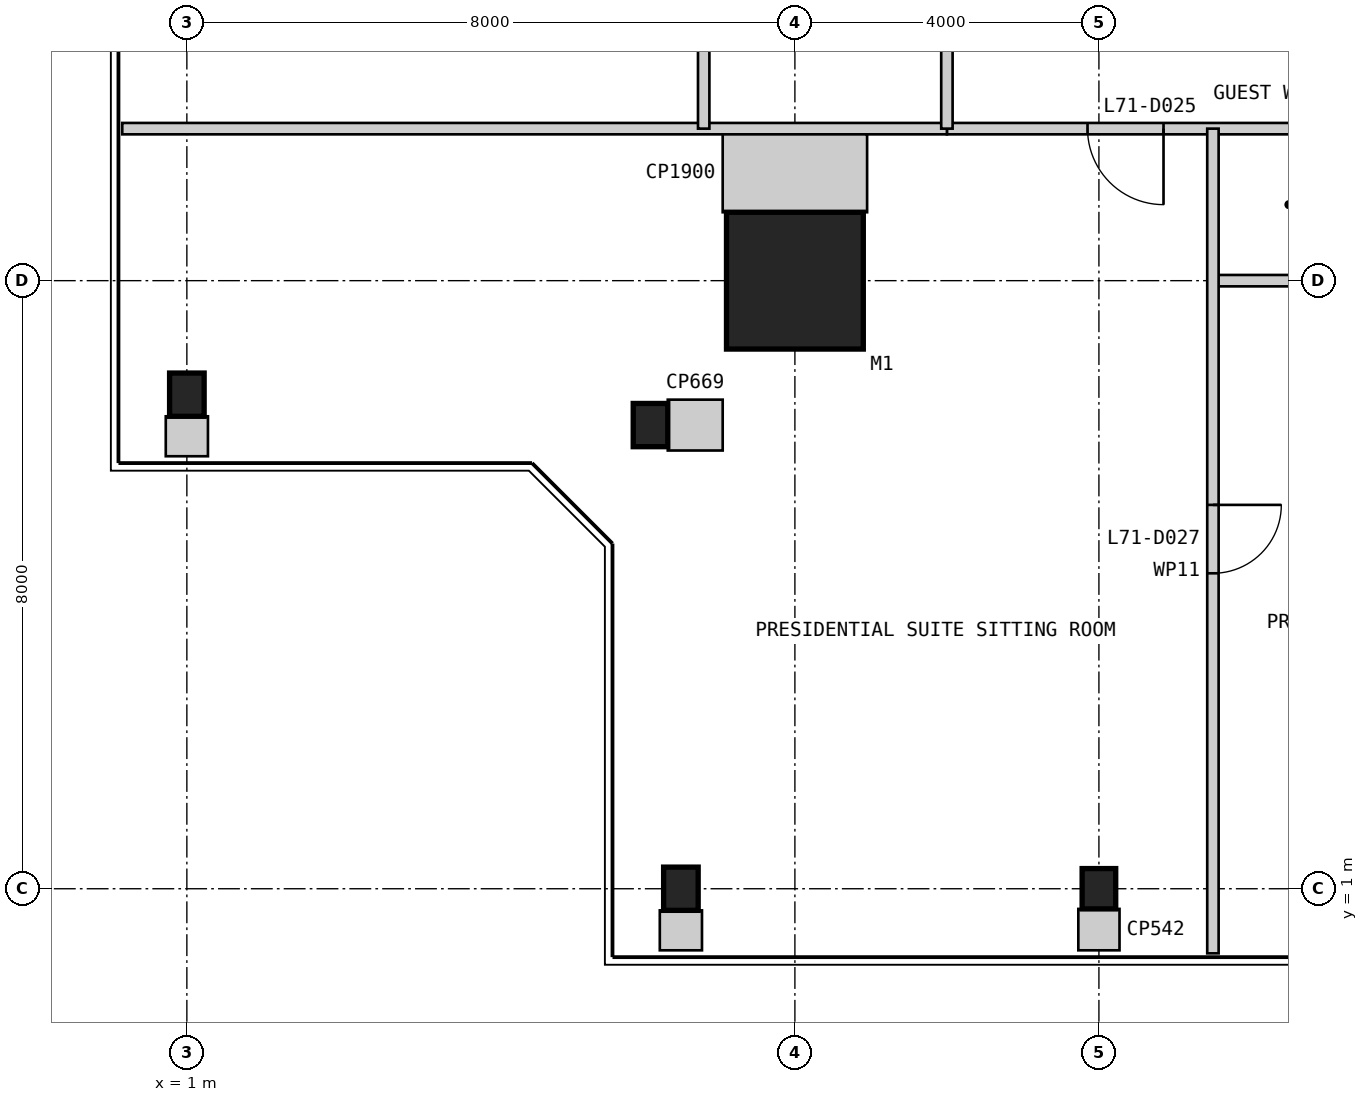
"""IFC4 building model, lengths in metres.
Left out: names, types, materials, properties, quantities, classifications, styles, units other than length and angle.
Written with IfcOpenShell. Run it as: python <this file> out.ifc"""

import sys

from ifc_helpers import new_model, si_unit, direction, frame, frame_2d, origin, origin_2d, place, context, subcontext, project, spatial, rectangle, i_section, extrude, element, fill, save


model = new_model("IFC4")
c1 = context("Model", 3, precision=1e-05, world=origin(), true_north=direction((0.0, 1.0)))
c2 = subcontext(c1, "Body", "Model", "MODEL_VIEW")
j1 = project(units=[si_unit("LENGTHUNIT", "METRE"), si_unit("PLANEANGLEUNIT", "RADIAN")], contexts=[c1])
p1 = place(None, origin())
s1 = spatial("IfcSite", under=j1, at=p1, CompositionType="ELEMENT")
p2 = place(p1, origin())
s2 = spatial("IfcBuilding", under=s1, at=p2, CompositionType="ELEMENT")
p3 = place(p2, frame((0.0, 0.0, 293.4)))
s3 = spatial("IfcBuildingStorey", under=s2, at=p3, CompositionType="ELEMENT", Elevation=293.4)
p4 = place(p3, frame((9.0, 9.0, 0.0), z_axis=(0.0, 0.0, 1.0), x_axis=(1.0, 0.0, 0.0)))
e1 = element("IfcColumn", 1, at=p4, inside=s3, PredefinedType="COLUMN", context=c2, shape_type="SweptSolid", body=[
    extrude(rectangle(XDim=1.8, YDim=1.8, at=origin_2d()), origin(), (0.0, 0.0, 1.0), 3.4),
])
p5 = place(p3, frame((7.5, 1.0, 0.0), z_axis=(0.0, 0.0, 1.0), x_axis=(1.0, 0.0, 0.0)))
e2 = element("IfcColumn", 2, at=p5, inside=s3, PredefinedType="COLUMN", context=c2, shape_type="SweptSolid", body=[
    extrude(i_section(OverallWidth=0.455, OverallDepth=0.569, WebThickness=0.078, FlangeThickness=0.125, at=origin_2d()), origin(), (0.0, 0.0, 1.0), 3.4),
])
p6 = place(p3, frame((13.0, 1.0, 0.0), z_axis=(0.0, 0.0, 1.0), x_axis=(1.0, 0.0, 0.0)))
e3 = element("IfcColumn", 3, at=p6, inside=s3, PredefinedType="COLUMN", context=c2, shape_type="SweptSolid", body=[
    extrude(i_section(OverallWidth=0.442, OverallDepth=0.531, WebThickness=0.066, FlangeThickness=0.106, at=origin_2d()), origin(), (0.0, 0.0, 1.0), 3.4),
])
for number, where, z_axis, x_axis in (
    (4, (1.0, 7.5, 0.0), (0.0, 0.0, 1.0), (1.0, 0.0, 0.0)),
    (5, (7.1, 7.1, 0.0), (0.0, 0.0, 1.0), (1.0, 0.0, 0.0)),
):
    element("IfcColumn", number, at=place(p3, frame(where, z_axis=z_axis, x_axis=x_axis)), inside=s3, PredefinedType="COLUMN", context=c2, shape_type="SweptSolid", body=[
        extrude(i_section(OverallWidth=0.455, OverallDepth=0.569, WebThickness=0.078, FlangeThickness=0.125, at=origin_2d()), origin(), (0.0, 0.0, 1.0), 3.4),
    ])
p7 = place(p3, frame((11.0, 11.0, 0.0), z_axis=(0.0, 0.0, 1.0), x_axis=(1.0, 0.0, 0.0)))
e6 = element("IfcWall", 6, at=p7, inside=s3, PredefinedType="PARTITIONING", context=c2, shape_type="SweptSolid", body=[
    extrude(rectangle(XDim=28.0, YDim=0.15, at=frame_2d((14.0, 0.0))), origin(), (0.0, 0.0, 1.0), 2.794),
])
p8 = place(p7, frame((1.85, 0.0, 0.0)))
e7 = element("IfcOpeningElement", 7, at=p8, cuts=e6, PredefinedType="OPENING", context=c2, shape_type="SweptSolid", body=[
    extrude(rectangle(XDim=1.0, YDim=2.1, at=frame_2d((0.5, 1.05))), frame((0.0, 0.085, 0.0), z_axis=(0.0, -1.0, 0.0), x_axis=(1.0, 0.0, 0.0)), (0.0, 0.0, 1.0), 0.17),
])
p9 = place(p7, frame((18.1, 0.0, 0.0)))
e8 = element("IfcOpeningElement", 8, at=p9, cuts=e6, PredefinedType="OPENING", context=c2, shape_type="SweptSolid", body=[
    extrude(rectangle(XDim=0.9, YDim=2.1, at=frame_2d((0.45, 1.05))), frame((0.0, 0.085, 0.0), z_axis=(0.0, -1.0, 0.0), x_axis=(1.0, 0.0, 0.0)), (0.0, 0.0, 1.0), 0.17),
])
p10 = place(p3, frame((0.15, 11.0, 0.0), z_axis=(0.0, 0.0, 1.0), x_axis=(1.0, 0.0, 0.0)))
e9 = element("IfcWall", 9, at=p10, inside=s3, PredefinedType="PARTITIONING", context=c2, shape_type="SweptSolid", body=[
    extrude(rectangle(XDim=10.85, YDim=0.15, at=frame_2d((5.425, 0.0))), origin(), (0.0, 0.0, 1.0), 2.794),
])
p11 = place(p3, frame((14.5, 9.0, 0.0), z_axis=(0.0, 0.0, 1.0), x_axis=(1.0, 0.0, 0.0)))
e10 = element("IfcWall", 10, at=p11, inside=s3, PredefinedType="PARTITIONING", context=c2, shape_type="SweptSolid", body=[
    extrude(rectangle(XDim=2.0, YDim=0.15, at=frame_2d((1.0, 0.0))), origin(), (0.0, 0.0, 1.0), 3.2),
])
p12 = place(p3, frame((14.5, 0.15, 0.0), z_axis=(0.0, 0.0, 1.0), x_axis=(0.0, 1.0, 0.0)))
e11 = element("IfcWall", 11, at=p12, inside=s3, PredefinedType="PARTITIONING", context=c2, shape_type="SweptSolid", body=[
    extrude(rectangle(XDim=10.85, YDim=0.15, at=frame_2d((5.425, 0.0))), origin(), (0.0, 0.0, 1.0), 3.2),
])
p13 = place(p12, frame((5.0, 0.0, 0.0)))
e12 = element("IfcOpeningElement", 12, at=p13, cuts=e11, PredefinedType="OPENING", context=c2, shape_type="SweptSolid", body=[
    extrude(rectangle(XDim=0.9, YDim=2.1, at=frame_2d((0.45, 1.05))), frame((0.0, 0.085, 0.0), z_axis=(0.0, -1.0, 0.0), x_axis=(1.0, 0.0, 0.0)), (0.0, 0.0, 1.0), 0.17),
])
p14 = place(p3, frame((11.0, 39.0, 0.0), z_axis=(0.0, 0.0, 1.0), x_axis=(0.0, -1.0, 0.0)))
e13 = element("IfcWall", 13, at=p14, inside=s3, PredefinedType="PARTITIONING", context=c2, shape_type="SweptSolid", body=[
    extrude(rectangle(XDim=28.0, YDim=0.15, at=frame_2d((14.0, 0.0))), origin(), (0.0, 0.0, 1.0), 2.794),
])
p15 = place(p14, frame((1.85, 0.0, 0.0)))
e14 = element("IfcOpeningElement", 14, at=p15, cuts=e13, PredefinedType="OPENING", context=c2, shape_type="SweptSolid", body=[
    extrude(rectangle(XDim=0.9, YDim=2.1, at=frame_2d((0.45, 1.05))), frame((0.0, 0.085, 0.0), z_axis=(0.0, -1.0, 0.0), x_axis=(1.0, 0.0, 0.0)), (0.0, 0.0, 1.0), 0.17),
])
p16 = place(p14, frame((11.0, 0.0, 0.0)))
e15 = element("IfcOpeningElement", 15, at=p16, cuts=e13, PredefinedType="OPENING", context=c2, shape_type="SweptSolid", body=[
    extrude(rectangle(XDim=0.9, YDim=2.1, at=frame_2d((0.45, 1.05))), frame((0.0, 0.085, 0.0), z_axis=(0.0, -1.0, 0.0), x_axis=(1.0, 0.0, 0.0)), (0.0, 0.0, 1.0), 0.17),
])
p17 = place(p14, frame((23.1, 0.0, 0.0)))
e16 = element("IfcOpeningElement", 16, at=p17, cuts=e13, PredefinedType="OPENING", context=c2, shape_type="SweptSolid", body=[
    extrude(rectangle(XDim=0.9, YDim=2.1, at=frame_2d((0.45, 1.05))), frame((0.0, 0.085, 0.0), z_axis=(0.0, -1.0, 0.0), x_axis=(1.0, 0.0, 0.0)), (0.0, 0.0, 1.0), 0.17),
])
p18 = place(p3, frame((7.8, 14.4, 0.0), z_axis=(0.0, 0.0, 1.0), x_axis=(0.0, -1.0, 0.0)))
e17 = element("IfcWall", 17, at=p18, inside=s3, PredefinedType="PARTITIONING", context=c2, shape_type="SweptSolid", body=[
    extrude(rectangle(XDim=3.4, YDim=0.15, at=frame_2d((1.7, 0.0))), origin(), (0.0, 0.0, 1.0), 3.2),
])
p19 = place(p3, frame((9.0, 10.925, 0.0), z_axis=(0.0, 0.0, 1.0), x_axis=(0.0, -1.0, 0.0)))
e18 = element("IfcWall", 18, at=p19, inside=s3, PredefinedType="PARTITIONING", context=c2, shape_type="SweptSolid", body=[
    extrude(rectangle(XDim=1.025, YDim=1.9, at=frame_2d((0.513, 0.0))), origin(), (0.0, 0.0, 1.0), 3.2),
])
p20 = place(p3, frame((7.5, 0.19, 0.0), z_axis=(0.0, 0.0, 1.0), x_axis=(0.0, 1.0, 0.0)))
e19 = element("IfcWall", 19, at=p20, inside=s3, PredefinedType="PARTITIONING", context=c2, shape_type="SweptSolid", body=[
    extrude(rectangle(XDim=0.526, YDim=0.555, at=frame_2d((0.263, 0.0))), origin(), (0.0, 0.0, 1.0), 3.2),
])
p21 = place(p3, frame((13.0, 0.19, 0.0), z_axis=(0.0, 0.0, 1.0), x_axis=(0.0, 1.0, 0.0)))
e20 = element("IfcWall", 20, at=p21, inside=s3, PredefinedType="PARTITIONING", context=c2, shape_type="SweptSolid", body=[
    extrude(rectangle(XDim=0.545, YDim=0.542, at=frame_2d((0.272, 0.0))), origin(), (0.0, 0.0, 1.0), 3.2),
])
p22 = place(p3, frame((1.0, 6.69, 0.0), z_axis=(0.0, 0.0, 1.0), x_axis=(0.0, 1.0, 0.0)))
e21 = element("IfcWall", 21, at=p22, inside=s3, PredefinedType="PARTITIONING", context=c2, shape_type="SweptSolid", body=[
    extrude(rectangle(XDim=0.526, YDim=0.555, at=frame_2d((0.263, 0.0))), origin(), (0.0, 0.0, 1.0), 3.2),
])
p23 = place(p3, frame((8.05, 7.1, 0.0), z_axis=(0.0, 0.0, 1.0), x_axis=(-1.0, 0.0, 0.0)))
e22 = element("IfcWall", 22, at=p23, inside=s3, PredefinedType="PARTITIONING", context=c2, shape_type="SweptSolid", body=[
    extrude(rectangle(XDim=0.723, YDim=0.669, at=frame_2d((0.361, 0.0))), origin(), (0.0, 0.0, 1.0), 3.2),
])
p24 = place(p8, frame((1.0, 0.0, 0.0), z_axis=(0.0, 0.0, 1.0), x_axis=(-1.0, 0.0, 0.0)))
e23 = element("IfcDoor", 23, at=p24, inside=s3, OperationType="SINGLE_SWING_LEFT", PredefinedType="DOOR", context=c2, shape_type="SweptSolid", body=[
    extrude(rectangle(XDim=1.0, YDim=2.1, at=frame_2d((0.5, 1.05))), frame((0.0, 0.025, 0.0), z_axis=(0.0, -1.0, 0.0), x_axis=(1.0, 0.0, 0.0)), (0.0, 0.0, 1.0), 0.05),
])
fill(e7, e23)
p25 = place(p13, frame((0.9, 0.0, 0.0), z_axis=(0.0, 0.0, 1.0), x_axis=(-1.0, 0.0, 0.0)))
e24 = element("IfcDoor", 24, at=p25, inside=s3, OperationType="SINGLE_SWING_LEFT", PredefinedType="DOOR", context=c2, shape_type="SweptSolid", body=[
    extrude(rectangle(XDim=0.9, YDim=2.1, at=frame_2d((0.45, 1.05))), frame((0.0, 0.025, 0.0), z_axis=(0.0, -1.0, 0.0), x_axis=(1.0, 0.0, 0.0)), (0.0, 0.0, 1.0), 0.05),
])
fill(e12, e24)
save(model, sys.argv[1])
